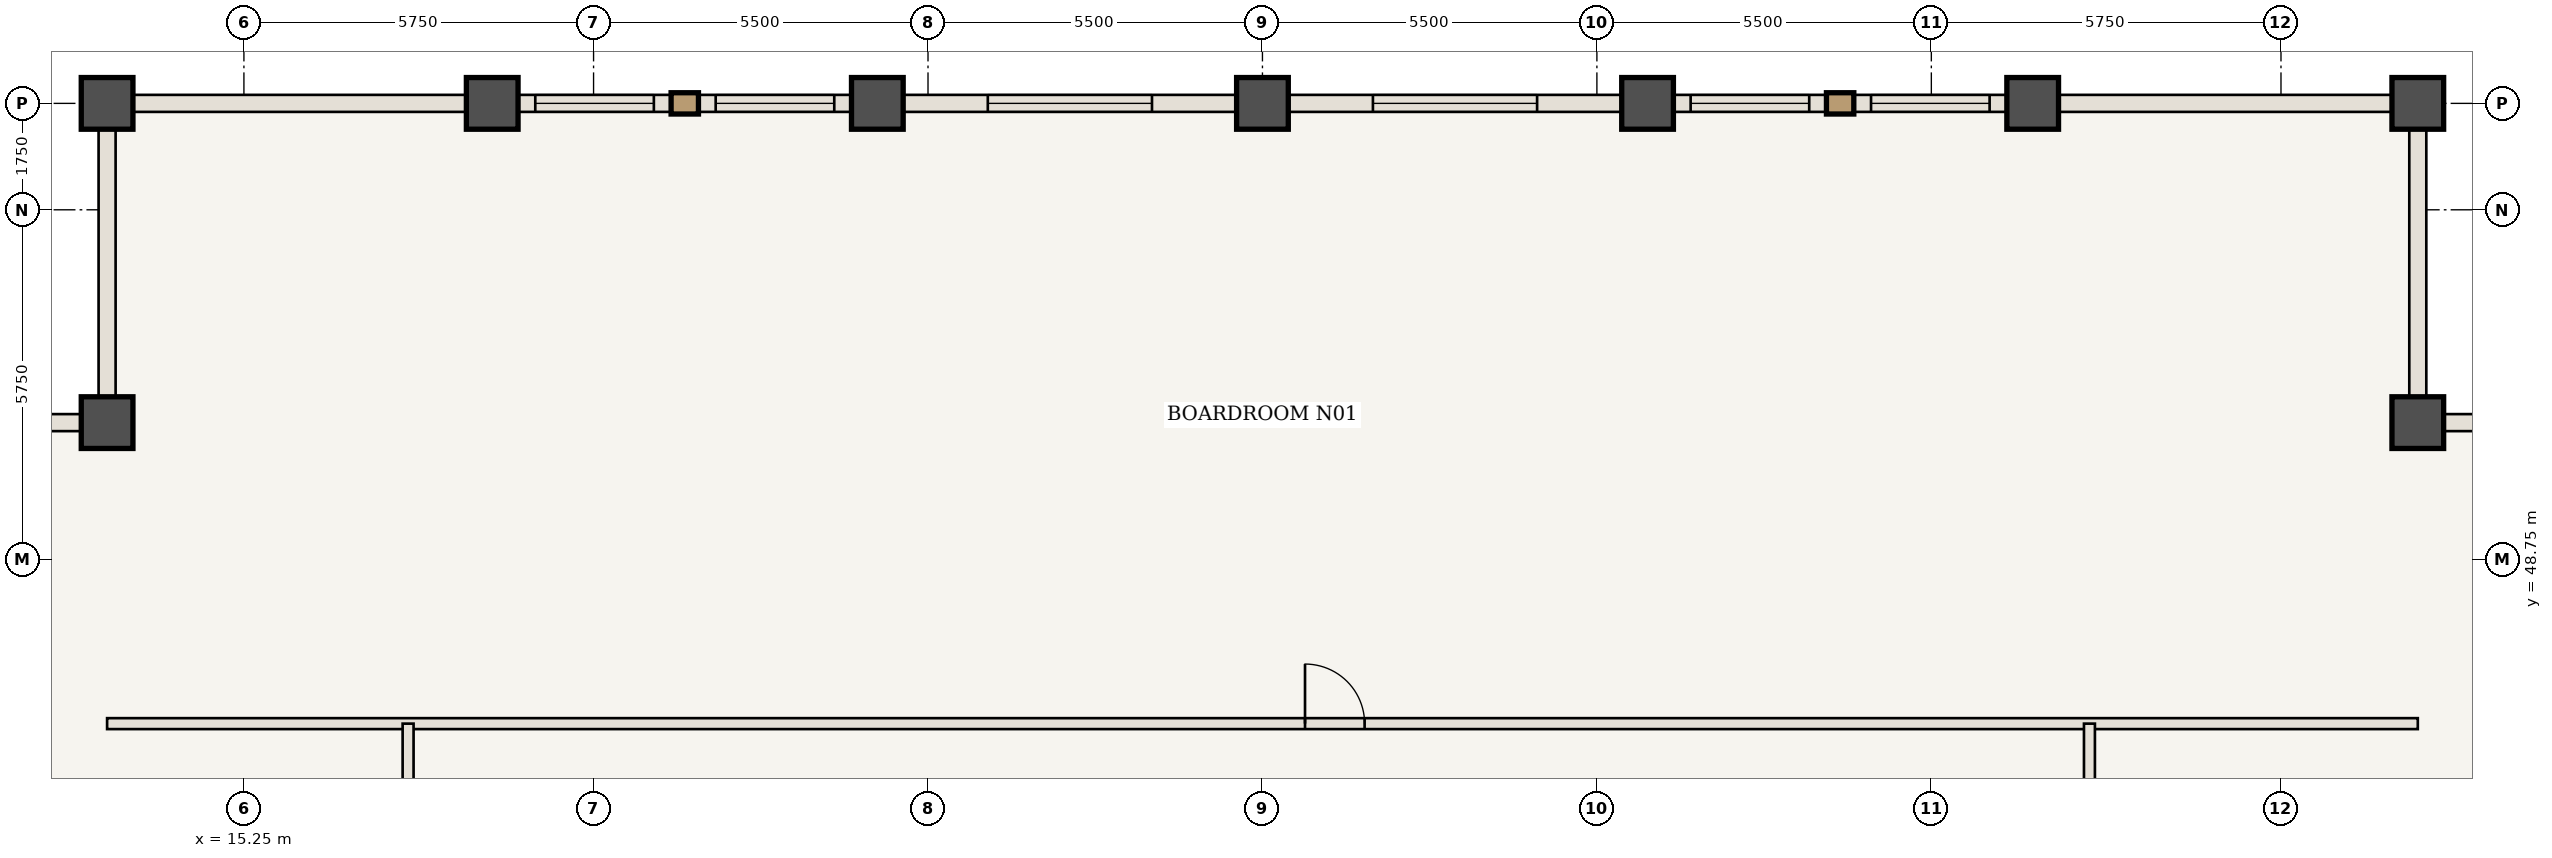
"""IFC4 building model, lengths in metres.
Left out: names, types, materials, properties, quantities, classifications, styles, units other than length and angle.
Written with IfcOpenShell. Run it as: python <this file> out.ifc"""

import sys

from ifc_helpers import new_model, si_unit, direction, frame, frame_2d, origin, origin_2d, place, context, subcontext, project, spatial, rectangle, extrude, element, fill, save


model = new_model("IFC4")
c1 = context("Model", 3, precision=1e-05, world=origin(), true_north=direction((0.0, 1.0)))
c2 = subcontext(c1, "Body", "Model", "MODEL_VIEW")
j1 = project(units=[si_unit("LENGTHUNIT", "METRE"), si_unit("PLANEANGLEUNIT", "RADIAN")], contexts=[c1])
p1 = place(None, origin())
s1 = spatial("IfcSite", under=j1, at=p1, CompositionType="ELEMENT")
p2 = place(p1, origin())
s2 = spatial("IfcBuilding", under=s1, at=p2, CompositionType="ELEMENT")
p3 = place(p2, frame((0.0, 0.0, 225.4)))
s3 = spatial("IfcBuildingStorey", under=s2, at=p3, CompositionType="ELEMENT", Elevation=225.4)
for number, where, z_axis, x_axis in (
    (1, (51.0, 51.0, 0.0), (0.0, 0.0, 1.0), (1.0, 0.0, 0.0)),
    (2, (51.0, 56.25, 0.0), (0.0, 0.0, 1.0), (1.0, 0.0, 0.0)),
    (3, (13.0, 56.25, 0.0), (0.0, 0.0, 1.0), (1.0, 0.0, 0.0)),
    (4, (13.0, 51.0, 0.0), (0.0, 0.0, 1.0), (1.0, 0.0, 0.0)),
    (5, (19.333, 56.25, 0.0), (0.0, 0.0, 1.0), (1.0, 0.0, 0.0)),
    (6, (25.667, 56.25, 0.0), (0.0, 0.0, 1.0), (1.0, 0.0, 0.0)),
    (7, (32.0, 56.25, 0.0), (0.0, 0.0, 1.0), (1.0, 0.0, 0.0)),
    (8, (38.333, 56.25, 0.0), (0.0, 0.0, 1.0), (1.0, 0.0, 0.0)),
    (9, (44.667, 56.25, 0.0), (0.0, 0.0, 1.0), (1.0, 0.0, 0.0)),
):
    element("IfcColumn", number, at=place(p3, frame(where, z_axis=z_axis, x_axis=x_axis)), inside=s3, PredefinedType="COLUMN", context=c2, shape_type="SweptSolid", body=[
        extrude(rectangle(XDim=0.85, YDim=0.85, at=origin_2d()), origin(), (0.0, 0.0, 1.0), 3.85),
    ])
p4 = place(p3, frame((13.0, 46.05, 0.0), z_axis=(0.0, 0.0, 1.0), x_axis=(1.0, 0.0, 0.0)))
e10 = element("IfcWall", 10, at=p4, inside=s3, PredefinedType="STANDARD", context=c2, shape_type="SweptSolid", body=[
    extrude(rectangle(XDim=38.0, YDim=0.18, at=frame_2d((19.0, 0.0))), origin(), (0.0, 0.0, 1.0), 3.685),
])
p5 = place(p4, frame((19.7, 0.0, 0.0)))
e11 = element("IfcOpeningElement", 11, at=p5, cuts=e10, PredefinedType="OPENING", context=c2, shape_type="SweptSolid", body=[
    extrude(rectangle(XDim=0.98, YDim=2.2, at=frame_2d((0.49, 1.1))), frame((0.0, 0.1, 0.0), z_axis=(0.0, -1.0, 0.0), x_axis=(1.0, 0.0, 0.0)), (0.0, 0.0, 1.0), 0.2),
])
p6 = place(p3, frame((17.95, 37.708, 0.0), z_axis=(0.0, 0.0, 1.0), x_axis=(0.0, 1.0, 0.0)))
e12 = element("IfcWall", 12, at=p6, inside=s3, PredefinedType="STANDARD", context=c2, shape_type="SweptSolid", body=[
    extrude(rectangle(XDim=8.342, YDim=0.18, at=frame_2d((4.171, 0.0))), origin(), (0.0, 0.0, 1.0), 3.685),
])
p7 = place(p6, frame((3.671, 0.0, 0.0)))
e13 = element("IfcOpeningElement", 13, at=p7, cuts=e12, PredefinedType="OPENING", context=c2, shape_type="SweptSolid", body=[
    extrude(rectangle(XDim=0.98, YDim=2.2, at=frame_2d((0.49, 1.1))), frame((0.0, 0.1, 0.0), z_axis=(0.0, -1.0, 0.0), x_axis=(1.0, 0.0, 0.0)), (0.0, 0.0, 1.0), 0.2),
])
p8 = place(p3, frame((45.6, 31.05, 0.0), z_axis=(0.0, 0.0, 1.0), x_axis=(0.0, 1.0, 0.0)))
e14 = element("IfcWall", 14, at=p8, inside=s3, PredefinedType="STANDARD", context=c2, shape_type="SweptSolid", body=[
    extrude(rectangle(XDim=15.0, YDim=0.18, at=frame_2d((7.5, 0.0))), origin(), (0.0, 0.0, 1.0), 3.685),
])
p9 = place(p8, frame((7.0, 0.0, 0.0)))
e15 = element("IfcOpeningElement", 15, at=p9, cuts=e14, PredefinedType="OPENING", context=c2, shape_type="SweptSolid", body=[
    extrude(rectangle(XDim=0.98, YDim=2.2, at=frame_2d((0.49, 1.1))), frame((0.0, 0.1, 0.0), z_axis=(0.0, -1.0, 0.0), x_axis=(1.0, 0.0, 0.0)), (0.0, 0.0, 1.0), 0.2),
])
p10 = place(p3, frame((13.0, 56.25, 0.0), z_axis=(0.0, 0.0, 1.0), x_axis=(1.0, 0.0, 0.0)))
e16 = element("IfcWall", 16, at=p10, inside=s3, PredefinedType="USERDEFINED", context=c2, shape_type="SweptSolid", body=[
    extrude(rectangle(XDim=6.333, YDim=0.28, at=frame_2d((3.167, 0.0))), origin(), (0.0, 0.0, 1.0), 2.985),
])
p11 = place(p3, frame((19.333, 56.25, 0.0), z_axis=(0.0, 0.0, 1.0), x_axis=(1.0, 0.0, 0.0)))
e17 = element("IfcWall", 17, at=p11, inside=s3, PredefinedType="USERDEFINED", context=c2, shape_type="SweptSolid", body=[
    extrude(rectangle(XDim=6.333, YDim=0.28, at=frame_2d((3.167, 0.0))), origin(), (0.0, 0.0, 1.0), 2.985),
])
p12 = place(p11, frame((0.708, 0.0, 0.85)))
e18 = element("IfcOpeningElement", 18, at=p12, cuts=e17, PredefinedType="OPENING", context=c2, shape_type="SweptSolid", body=[
    extrude(rectangle(XDim=1.95, YDim=1.935, at=frame_2d((0.975, 0.968))), frame((0.0, 0.15, 0.0), z_axis=(0.0, -1.0, 0.0), x_axis=(1.0, 0.0, 0.0)), (0.0, 0.0, 1.0), 0.3),
])
p13 = place(p11, frame((3.675, 0.0, 0.85)))
e19 = element("IfcOpeningElement", 19, at=p13, cuts=e17, PredefinedType="OPENING", context=c2, shape_type="SweptSolid", body=[
    extrude(rectangle(XDim=1.95, YDim=1.935, at=frame_2d((0.975, 0.968))), frame((0.0, 0.15, 0.0), z_axis=(0.0, -1.0, 0.0), x_axis=(1.0, 0.0, 0.0)), (0.0, 0.0, 1.0), 0.3),
])
p14 = place(p3, frame((25.667, 56.25, 0.0), z_axis=(0.0, 0.0, 1.0), x_axis=(1.0, 0.0, 0.0)))
e20 = element("IfcWall", 20, at=p14, inside=s3, PredefinedType="USERDEFINED", context=c2, shape_type="SweptSolid", body=[
    extrude(rectangle(XDim=6.333, YDim=0.28, at=frame_2d((3.167, 0.0))), origin(), (0.0, 0.0, 1.0), 2.985),
])
p15 = place(p14, frame((1.817, 0.0, 0.85)))
e21 = element("IfcOpeningElement", 21, at=p15, cuts=e20, PredefinedType="OPENING", context=c2, shape_type="SweptSolid", body=[
    extrude(rectangle(XDim=2.7, YDim=1.935, at=frame_2d((1.35, 0.968))), frame((0.0, 0.15, 0.0), z_axis=(0.0, -1.0, 0.0), x_axis=(1.0, 0.0, 0.0)), (0.0, 0.0, 1.0), 0.3),
])
p16 = place(p3, frame((32.0, 56.25, 0.0), z_axis=(0.0, 0.0, 1.0), x_axis=(1.0, 0.0, 0.0)))
e22 = element("IfcWall", 22, at=p16, inside=s3, PredefinedType="USERDEFINED", context=c2, shape_type="SweptSolid", body=[
    extrude(rectangle(XDim=6.333, YDim=0.28, at=frame_2d((3.167, 0.0))), origin(), (0.0, 0.0, 1.0), 2.985),
])
p17 = place(p16, frame((1.817, 0.0, 0.85)))
e23 = element("IfcOpeningElement", 23, at=p17, cuts=e22, PredefinedType="OPENING", context=c2, shape_type="SweptSolid", body=[
    extrude(rectangle(XDim=2.7, YDim=1.935, at=frame_2d((1.35, 0.968))), frame((0.0, 0.15, 0.0), z_axis=(0.0, -1.0, 0.0), x_axis=(1.0, 0.0, 0.0)), (0.0, 0.0, 1.0), 0.3),
])
p18 = place(p3, frame((38.333, 56.25, 0.0), z_axis=(0.0, 0.0, 1.0), x_axis=(1.0, 0.0, 0.0)))
e24 = element("IfcWall", 24, at=p18, inside=s3, PredefinedType="USERDEFINED", context=c2, shape_type="SweptSolid", body=[
    extrude(rectangle(XDim=6.333, YDim=0.28, at=frame_2d((3.167, 0.0))), origin(), (0.0, 0.0, 1.0), 2.985),
])
p19 = place(p18, frame((0.708, 0.0, 0.85)))
e25 = element("IfcOpeningElement", 25, at=p19, cuts=e24, PredefinedType="OPENING", context=c2, shape_type="SweptSolid", body=[
    extrude(rectangle(XDim=1.95, YDim=1.935, at=frame_2d((0.975, 0.968))), frame((0.0, 0.15, 0.0), z_axis=(0.0, -1.0, 0.0), x_axis=(1.0, 0.0, 0.0)), (0.0, 0.0, 1.0), 0.3),
])
p20 = place(p18, frame((3.675, 0.0, 0.85)))
e26 = element("IfcOpeningElement", 26, at=p20, cuts=e24, PredefinedType="OPENING", context=c2, shape_type="SweptSolid", body=[
    extrude(rectangle(XDim=1.95, YDim=1.935, at=frame_2d((0.975, 0.968))), frame((0.0, 0.15, 0.0), z_axis=(0.0, -1.0, 0.0), x_axis=(1.0, 0.0, 0.0)), (0.0, 0.0, 1.0), 0.3),
])
p21 = place(p3, frame((44.667, 56.25, 0.0), z_axis=(0.0, 0.0, 1.0), x_axis=(1.0, 0.0, 0.0)))
e27 = element("IfcWall", 27, at=p21, inside=s3, PredefinedType="USERDEFINED", context=c2, shape_type="SweptSolid", body=[
    extrude(rectangle(XDim=6.333, YDim=0.28, at=frame_2d((3.167, 0.0))), origin(), (0.0, 0.0, 1.0), 2.985),
])
for number, where, z_axis, x_axis in (
    (28, (51.0, 51.0, 0.0), (0.0, 0.0, 1.0), (1.0, 0.0, 0.0)),
    (29, (51.0, 56.25, 0.0), (0.0, 0.0, 1.0), (0.0, -1.0, 0.0)),
    (30, (13.0, 51.0, 0.0), (0.0, 0.0, 1.0), (0.0, 1.0, 0.0)),
    (31, (7.75, 51.0, 0.0), (0.0, 0.0, 1.0), (1.0, 0.0, 0.0)),
):
    element("IfcWall", number, at=place(p3, frame(where, z_axis=z_axis, x_axis=x_axis)), inside=s3, PredefinedType="USERDEFINED", context=c2, shape_type="SweptSolid", body=[
        extrude(rectangle(XDim=5.25, YDim=0.28, at=frame_2d((2.625, 0.0))), origin(), (0.0, 0.0, 1.0), 2.985),
    ])
p22 = place(p5, origin())
e32 = element("IfcDoor", 32, at=p22, inside=s3, OperationType="SINGLE_SWING_LEFT", PredefinedType="DOOR", context=c2, shape_type="SweptSolid", body=[
    extrude(rectangle(XDim=0.98, YDim=2.2, at=frame_2d((0.49, 1.1))), frame((0.0, 0.025, 0.0), z_axis=(0.0, -1.0, 0.0), x_axis=(1.0, 0.0, 0.0)), (0.0, 0.0, 1.0), 0.05),
])
fill(e11, e32)
p23 = place(p12, origin())
e33 = element("IfcWindow", 33, at=p23, inside=s3, PartitioningType="SINGLE_PANEL", PredefinedType="WINDOW", context=c2, shape_type="SweptSolid", body=[
    extrude(rectangle(XDim=1.95, YDim=1.935, at=frame_2d((0.975, 0.968))), frame((0.0, 0.03, 0.0), z_axis=(0.0, -1.0, 0.0), x_axis=(1.0, 0.0, 0.0)), (0.0, 0.0, 1.0), 0.06),
])
fill(e18, e33)
p24 = place(p13, origin())
e34 = element("IfcWindow", 34, at=p24, inside=s3, PartitioningType="SINGLE_PANEL", PredefinedType="WINDOW", context=c2, shape_type="SweptSolid", body=[
    extrude(rectangle(XDim=1.95, YDim=1.935, at=frame_2d((0.975, 0.968))), frame((0.0, 0.03, 0.0), z_axis=(0.0, -1.0, 0.0), x_axis=(1.0, 0.0, 0.0)), (0.0, 0.0, 1.0), 0.06),
])
fill(e19, e34)
p25 = place(p15, origin())
e35 = element("IfcWindow", 35, at=p25, inside=s3, PartitioningType="SINGLE_PANEL", PredefinedType="WINDOW", context=c2, shape_type="SweptSolid", body=[
    extrude(rectangle(XDim=2.7, YDim=1.935, at=frame_2d((1.35, 0.968))), frame((0.0, 0.03, 0.0), z_axis=(0.0, -1.0, 0.0), x_axis=(1.0, 0.0, 0.0)), (0.0, 0.0, 1.0), 0.06),
])
fill(e21, e35)
p26 = place(p17, origin())
e36 = element("IfcWindow", 36, at=p26, inside=s3, PartitioningType="SINGLE_PANEL", PredefinedType="WINDOW", context=c2, shape_type="SweptSolid", body=[
    extrude(rectangle(XDim=2.7, YDim=1.935, at=frame_2d((1.35, 0.968))), frame((0.0, 0.03, 0.0), z_axis=(0.0, -1.0, 0.0), x_axis=(1.0, 0.0, 0.0)), (0.0, 0.0, 1.0), 0.06),
])
fill(e23, e36)
p27 = place(p19, origin())
e37 = element("IfcWindow", 37, at=p27, inside=s3, PartitioningType="SINGLE_PANEL", PredefinedType="WINDOW", context=c2, shape_type="SweptSolid", body=[
    extrude(rectangle(XDim=1.95, YDim=1.935, at=frame_2d((0.975, 0.968))), frame((0.0, 0.03, 0.0), z_axis=(0.0, -1.0, 0.0), x_axis=(1.0, 0.0, 0.0)), (0.0, 0.0, 1.0), 0.06),
])
fill(e25, e37)
p28 = place(p20, origin())
e38 = element("IfcWindow", 38, at=p28, inside=s3, PartitioningType="SINGLE_PANEL", PredefinedType="WINDOW", context=c2, shape_type="SweptSolid", body=[
    extrude(rectangle(XDim=1.95, YDim=1.935, at=frame_2d((0.975, 0.968))), frame((0.0, 0.03, 0.0), z_axis=(0.0, -1.0, 0.0), x_axis=(1.0, 0.0, 0.0)), (0.0, 0.0, 1.0), 0.06),
])
fill(e26, e38)
save(model, sys.argv[1])
